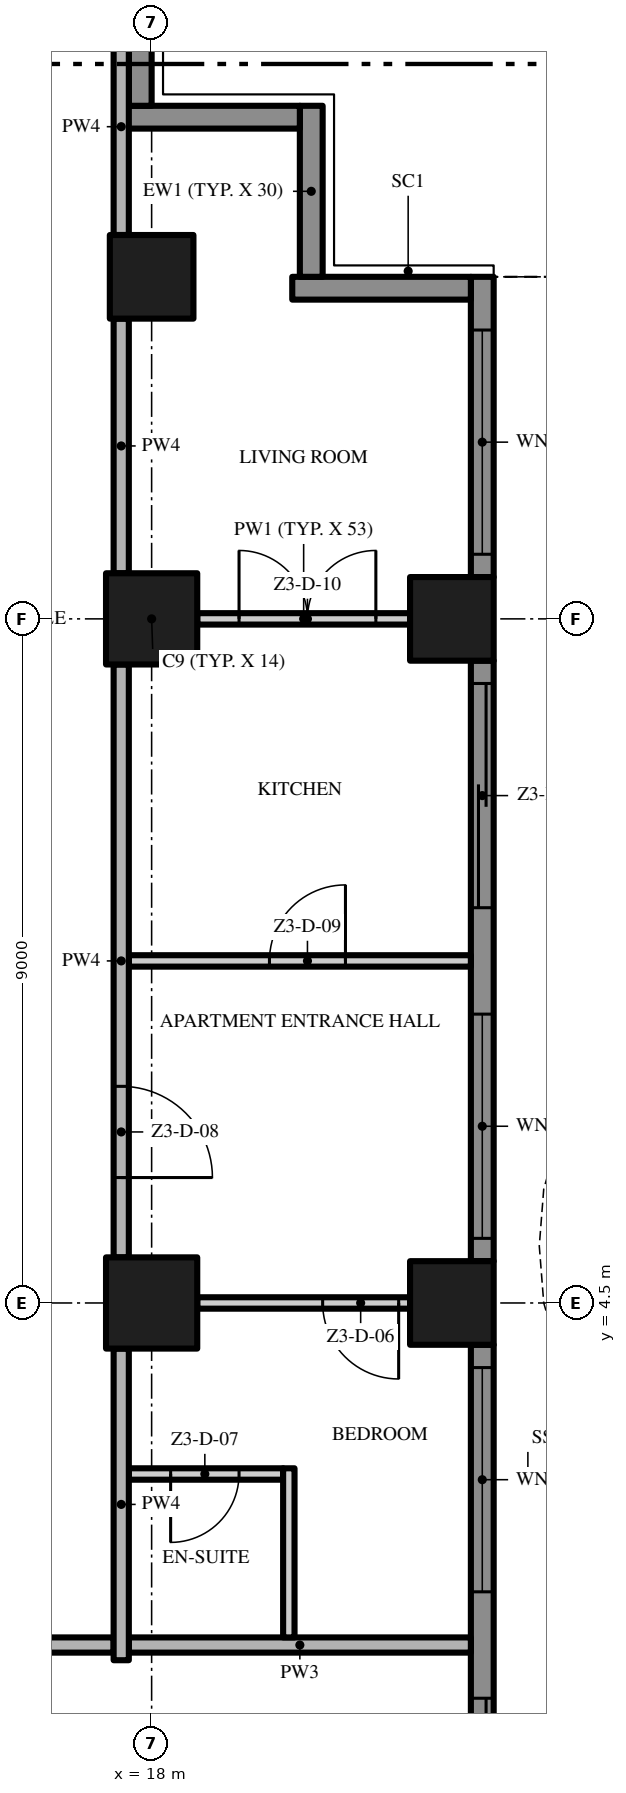
"""IFC4 building model, lengths in metres.
Left out: names, types, materials, properties, quantities, classifications, styles, units other than length and angle.
Written with IfcOpenShell. Run it as: python <this file> out.ifc"""

import sys

from ifc_helpers import new_model, si_unit, direction, frame, frame_2d, origin, origin_2d, place, context, subcontext, project, spatial, polyline, rectangle, outline, extrude, element, fill, save


model = new_model("IFC4")
c1 = context("Model", 3, precision=1e-05, world=origin(), true_north=direction((0.0, 1.0)))
c2 = subcontext(c1, "Body", "Model", "MODEL_VIEW")
j1 = project(units=[si_unit("LENGTHUNIT", "METRE"), si_unit("PLANEANGLEUNIT", "RADIAN")], contexts=[c1])
p1 = place(None, origin())
s1 = spatial("IfcSite", under=j1, at=p1, CompositionType="ELEMENT")
p2 = place(p1, origin())
s2 = spatial("IfcBuilding", under=s1, at=p2, CompositionType="ELEMENT")
p3 = place(p2, frame((0.0, 0.0, 159.2)))
s3 = spatial("IfcBuildingStorey", under=s2, at=p3, CompositionType="ELEMENT", Elevation=159.2)
for number, where, z_axis, x_axis in (
    (1, (18.0, 13.5, 0.0), (0.0, 0.0, 1.0), (1.0, 0.0, 0.0)),
    (2, (18.0, 4.5, 0.0), (0.0, 0.0, 1.0), (1.0, 0.0, 0.0)),
):
    element("IfcColumn", number, at=place(p3, frame(where, z_axis=z_axis, x_axis=x_axis)), inside=s3, PredefinedType="COLUMN", context=c2, shape_type="SweptSolid", body=[
        extrude(rectangle(XDim=1.2, YDim=1.2, at=origin_2d()), origin(), (0.0, 0.0, 1.0), 3.5),
    ])
for number, where, z_axis, x_axis in (
    (3, (21.95, 13.5, 0.0), (0.0, 0.0, 1.0), (1.0, 0.0, 0.0)),
    (4, (18.0, 18.0, 0.0), (0.0, 0.0, 1.0), (1.0, 0.0, 0.0)),
    (5, (21.95, 4.5, 0.0), (0.0, 0.0, 1.0), (1.0, 0.0, 0.0)),
):
    element("IfcColumn", number, at=place(p3, frame(where, z_axis=z_axis, x_axis=x_axis)), inside=s3, PredefinedType="COLUMN", context=c2, shape_type="SweptSolid", body=[
        extrude(rectangle(XDim=1.1, YDim=1.1, at=origin_2d()), origin(), (0.0, 0.0, 1.0), 3.5),
    ])
p4 = place(p3, frame((22.35, 3.95, 0.0), z_axis=(0.0, 0.0, 1.0), x_axis=(0.0, -1.0, 0.0)))
e6 = element("IfcWall", 6, at=p4, inside=s3, PredefinedType="SOLIDWALL", context=c2, shape_type="SweptSolid", body=[
    extrude(rectangle(XDim=7.9, YDim=0.3, at=frame_2d((3.95, 0.0))), origin(), (0.0, 0.0, 1.0), 3.5),
])
p5 = place(p4, frame((4.65, 0.0, 0.0)))
e7 = element("IfcOpeningElement", 7, at=p5, cuts=e6, PredefinedType="OPENING", context=c2, shape_type="SweptSolid", body=[
    extrude(rectangle(XDim=2.95, YDim=2.4, at=frame_2d((1.475, 1.2))), frame((0.0, 0.16, 0.0), z_axis=(0.0, -1.0, 0.0), x_axis=(1.0, 0.0, 0.0)), (0.0, 0.0, 1.0), 0.32),
])
p6 = place(p4, frame((0.3, 0.0, 0.45)))
e8 = element("IfcOpeningElement", 8, at=p6, cuts=e6, PredefinedType="OPENING", context=c2, shape_type="SweptSolid", body=[
    extrude(rectangle(XDim=2.95, YDim=2.65, at=frame_2d((1.475, 1.325))), frame((0.0, 0.16, 0.0), z_axis=(0.0, -1.0, 0.0), x_axis=(1.0, 0.0, 0.0)), (0.0, 0.0, 1.0), 0.32),
])
p7 = place(p3, frame((22.35, 12.95, 0.0), z_axis=(0.0, 0.0, 1.0), x_axis=(0.0, -1.0, 0.0)))
e9 = element("IfcWall", 9, at=p7, inside=s3, PredefinedType="SOLIDWALL", context=c2, shape_type="SweptSolid", body=[
    extrude(rectangle(XDim=7.9, YDim=0.3, at=frame_2d((3.95, 0.0))), origin(), (0.0, 0.0, 1.0), 3.5),
])
p8 = place(p7, frame((4.65, 0.0, 0.45)))
e10 = element("IfcOpeningElement", 10, at=p8, cuts=e9, PredefinedType="OPENING", context=c2, shape_type="SweptSolid", body=[
    extrude(rectangle(XDim=2.95, YDim=2.65, at=frame_2d((1.475, 1.325))), frame((0.0, 0.16, 0.0), z_axis=(0.0, -1.0, 0.0), x_axis=(1.0, 0.0, 0.0)), (0.0, 0.0, 1.0), 0.32),
])
p9 = place(p7, frame((0.3, 0.0, 0.0)))
e11 = element("IfcOpeningElement", 11, at=p9, cuts=e9, PredefinedType="OPENING", context=c2, shape_type="SweptSolid", body=[
    extrude(rectangle(XDim=2.95, YDim=2.4, at=frame_2d((1.475, 1.2))), frame((0.0, 0.16, 0.0), z_axis=(0.0, -1.0, 0.0), x_axis=(1.0, 0.0, 0.0)), (0.0, 0.0, 1.0), 0.32),
])
p10 = place(p3, frame((22.35, 18.0, 0.0), z_axis=(0.0, 0.0, 1.0), x_axis=(0.0, -1.0, 0.0)))
e12 = element("IfcWall", 12, at=p10, inside=s3, PredefinedType="SOLIDWALL", context=c2, shape_type="SweptSolid", body=[
    extrude(rectangle(XDim=3.95, YDim=0.3, at=frame_2d((1.975, 0.0))), origin(), (0.0, 0.0, 1.0), 3.5),
])
p11 = place(p10, frame((0.7, 0.0, 0.45)))
e13 = element("IfcOpeningElement", 13, at=p11, cuts=e12, PredefinedType="OPENING", context=c2, shape_type="SweptSolid", body=[
    extrude(rectangle(XDim=2.95, YDim=2.65, at=frame_2d((1.475, 1.325))), frame((0.0, 0.16, 0.0), z_axis=(0.0, -1.0, 0.0), x_axis=(1.0, 0.0, 0.0)), (0.0, 0.0, 1.0), 0.32),
])
p12 = place(p3, frame((19.85, 17.85, 0.0), z_axis=(0.0, 0.0, 1.0), x_axis=(1.0, 0.0, 0.0)))
e14 = element("IfcWall", 14, at=p12, inside=s3, PredefinedType="SOLIDWALL", context=c2, shape_type="SweptSolid", body=[
    extrude(rectangle(XDim=2.35, YDim=0.3, at=frame_2d((1.175, 0.0))), origin(), (0.0, 0.0, 1.0), 3.5),
])
p13 = place(p3, frame((20.1, 20.25, 0.0), z_axis=(0.0, 0.0, 1.0), x_axis=(0.0, -1.0, 0.0)))
e15 = element("IfcWall", 15, at=p13, inside=s3, PredefinedType="SOLIDWALL", context=c2, shape_type="SweptSolid", body=[
    extrude(rectangle(XDim=2.25, YDim=0.3, at=frame_2d((1.125, 0.0))), origin(), (0.0, 0.0, 1.0), 3.5),
])
p14 = place(p3, frame((17.6, 20.1, 0.0), z_axis=(0.0, 0.0, 1.0), x_axis=(1.0, 0.0, 0.0)))
e16 = element("IfcWall", 16, at=p14, inside=s3, PredefinedType="SOLIDWALL", context=c2, shape_type="SweptSolid", body=[
    extrude(rectangle(XDim=2.35, YDim=0.3, at=frame_2d((1.175, 0.0))), origin(), (0.0, 0.0, 1.0), 3.5),
])
p15 = place(p3, frame((17.85, 21.4, 0.0), z_axis=(0.0, 0.0, 1.0), x_axis=(0.0, -1.0, 0.0)))
e17 = element("IfcWall", 17, at=p15, inside=s3, PredefinedType="SOLIDWALL", context=c2, shape_type="SweptSolid", body=[
    extrude(rectangle(XDim=1.15, YDim=0.3, at=frame_2d((0.575, 0.0))), origin(), (0.0, 0.0, 1.0), 3.5),
])
p16 = place(p3, origin())
e18 = element("IfcWall", 18, at=p16, inside=s3, PredefinedType="USERDEFINED", context=c2, shape_type="SweptSolid", body=[
    extrude(outline(polyline([(24.3, -13.5), (23.595, -12.0), (23.159, -10.5), (23.1, -9.75), (23.159, -9.0), (23.595, -7.5), (24.3, -6.0), (25.005, -4.5), (25.441, -3.0), (25.5, -2.25), (25.441, -1.5), (25.005, 0.0), (24.3, 1.5), (23.595, 3.0), (23.159, 4.5), (23.1, 5.25), (23.159, 6.0), (23.595, 7.5), (24.3, 9.0), (25.005, 10.5), (25.441, 12.0), (25.5, 12.75), (25.441, 13.5), (25.005, 15.0), (24.3, 16.5), (23.595, 18.0), (23.368, 17.894), (24.074, 16.394), (24.771, 14.911), (25.194, 13.455), (25.249, 12.75), (25.194, 12.045), (24.771, 10.589), (24.074, 9.106), (23.36, 7.589), (22.911, 6.045), (22.849, 5.25), (22.911, 4.455), (23.36, 2.911), (24.074, 1.394), (24.771, -0.089), (25.194, -1.545), (25.249, -2.25), (25.194, -2.955), (24.771, -4.411), (24.074, -5.894), (23.36, -7.411), (22.911, -8.955), (22.849, -9.75), (22.911, -10.545), (23.36, -12.089), (24.074, -13.606), (24.3, -13.5)])), origin(), (0.0, 0.0, 1.0), 0.9),
])
p17 = place(p3, frame((17.5, 0.0, 0.0), z_axis=(0.0, 0.0, 1.0), x_axis=(-1.0, 0.0, 0.0)))
e19 = element("IfcWall", 19, at=p17, inside=s3, PredefinedType="PARTITIONING", context=c2, shape_type="SweptSolid", body=[
    extrude(rectangle(XDim=35.0, YDim=0.2, at=frame_2d((17.5, 0.0))), origin(), (0.0, 0.0, 1.0), 3.5),
])
p18 = place(p17, frame((23.5, 0.0, 0.0)))
e20 = element("IfcOpeningElement", 20, at=p18, cuts=e19, PredefinedType="OPENING", context=c2, shape_type="SweptSolid", body=[
    extrude(rectangle(XDim=1.5, YDim=2.4, at=frame_2d((0.75, 1.2))), frame((0.0, 0.11, 0.0), z_axis=(0.0, -1.0, 0.0), x_axis=(1.0, 0.0, 0.0)), (0.0, 0.0, 1.0), 0.22),
])
p19 = place(p17, frame((5.5, 0.0, 0.0)))
e21 = element("IfcOpeningElement", 21, at=p19, cuts=e19, PredefinedType="OPENING", context=c2, shape_type="SweptSolid", body=[
    extrude(rectangle(XDim=1.5, YDim=2.4, at=frame_2d((0.75, 1.2))), frame((0.0, 0.11, 0.0), z_axis=(0.0, -1.0, 0.0), x_axis=(1.0, 0.0, 0.0)), (0.0, 0.0, 1.0), 0.22),
])
p20 = place(p3, frame((17.7, 0.0, 0.0), z_axis=(0.0, 0.0, 1.0), x_axis=(1.0, 0.0, 0.0)))
e22 = element("IfcWall", 22, at=p20, inside=s3, PredefinedType="PARTITIONING", context=c2, shape_type="SweptSolid", body=[
    extrude(rectangle(XDim=4.5, YDim=0.2, at=frame_2d((2.25, 0.0))), origin(), (0.0, 0.0, 1.0), 3.5),
])
p21 = place(p3, frame((19.73, 2.25, 0.0), z_axis=(0.0, 0.0, 1.0), x_axis=(-1.0, 0.0, 0.0)))
e23 = element("IfcWall", 23, at=p21, inside=s3, PredefinedType="PARTITIONING", context=c2, shape_type="SweptSolid", body=[
    extrude(rectangle(XDim=2.03, YDim=0.15, at=frame_2d((1.015, 0.0))), origin(), (0.0, 0.0, 1.0), 3.5),
])
p22 = place(p21, frame((0.58, 0.0, 0.0)))
e24 = element("IfcOpeningElement", 24, at=p22, cuts=e23, PredefinedType="OPENING", context=c2, shape_type="SweptSolid", body=[
    extrude(rectangle(XDim=0.9, YDim=2.1, at=frame_2d((0.45, 1.05))), frame((0.0, 0.085, 0.0), z_axis=(0.0, -1.0, 0.0), x_axis=(1.0, 0.0, 0.0)), (0.0, 0.0, 1.0), 0.17),
])
p23 = place(p3, frame((21.4, 4.5, 0.0), z_axis=(0.0, 0.0, 1.0), x_axis=(-1.0, 0.0, 0.0)))
e25 = element("IfcWall", 25, at=p23, inside=s3, PredefinedType="PARTITIONING", context=c2, shape_type="SweptSolid", body=[
    extrude(rectangle(XDim=2.8, YDim=0.15, at=frame_2d((1.4, 0.0))), origin(), (0.0, 0.0, 1.0), 3.5),
])
p24 = place(p23, frame((0.15, 0.0, 0.0)))
e26 = element("IfcOpeningElement", 26, at=p24, cuts=e25, PredefinedType="OPENING", context=c2, shape_type="SweptSolid", body=[
    extrude(rectangle(XDim=1.0, YDim=2.4, at=frame_2d((0.5, 1.2))), frame((0.0, 0.085, 0.0), z_axis=(0.0, -1.0, 0.0), x_axis=(1.0, 0.0, 0.0)), (0.0, 0.0, 1.0), 0.17),
])
p25 = place(p3, frame((17.7, 9.0, 0.0), z_axis=(0.0, 0.0, 1.0), x_axis=(1.0, 0.0, 0.0)))
e27 = element("IfcWall", 27, at=p25, inside=s3, PredefinedType="PARTITIONING", context=c2, shape_type="SweptSolid", body=[
    extrude(rectangle(XDim=4.5, YDim=0.15, at=frame_2d((2.25, 0.0))), origin(), (0.0, 0.0, 1.0), 3.5),
])
p26 = place(p25, frame((1.85, 0.0, 0.0)))
e28 = element("IfcOpeningElement", 28, at=p26, cuts=e27, PredefinedType="OPENING", context=c2, shape_type="SweptSolid", body=[
    extrude(rectangle(XDim=1.0, YDim=2.4, at=frame_2d((0.5, 1.2))), frame((0.0, 0.085, 0.0), z_axis=(0.0, -1.0, 0.0), x_axis=(1.0, 0.0, 0.0)), (0.0, 0.0, 1.0), 0.17),
])
p27 = place(p3, frame((18.6, 13.5, 0.0), z_axis=(0.0, 0.0, 1.0), x_axis=(1.0, 0.0, 0.0)))
e29 = element("IfcWall", 29, at=p27, inside=s3, PredefinedType="PARTITIONING", context=c2, shape_type="SweptSolid", body=[
    extrude(rectangle(XDim=2.8, YDim=0.15, at=frame_2d((1.4, 0.0))), origin(), (0.0, 0.0, 1.0), 3.5),
])
p28 = place(p27, frame((0.55, 0.0, 0.0)))
e30 = element("IfcOpeningElement", 30, at=p28, cuts=e29, PredefinedType="OPENING", context=c2, shape_type="SweptSolid", body=[
    extrude(rectangle(XDim=1.8, YDim=2.4, at=frame_2d((0.9, 1.2))), frame((0.0, 0.085, 0.0), z_axis=(0.0, -1.0, 0.0), x_axis=(1.0, 0.0, 0.0)), (0.0, 0.0, 1.0), 0.17),
])
p29 = place(p3, frame((17.6, -0.2, 0.0), z_axis=(0.0, 0.0, 1.0), x_axis=(0.0, 1.0, 0.0)))
e31 = element("IfcWall", 31, at=p29, inside=s3, PredefinedType="PARTITIONING", context=c2, shape_type="SweptSolid", body=[
    extrude(rectangle(XDim=4.1, YDim=0.2, at=frame_2d((2.05, 0.0))), origin(), (0.0, 0.0, 1.0), 3.5),
])
p30 = place(p3, frame((17.6, 12.9, 0.0), z_axis=(0.0, 0.0, 1.0), x_axis=(0.0, -1.0, 0.0)))
e32 = element("IfcWall", 32, at=p30, inside=s3, PredefinedType="PARTITIONING", context=c2, shape_type="SweptSolid", body=[
    extrude(rectangle(XDim=7.8, YDim=0.2, at=frame_2d((3.9, 0.0))), origin(), (0.0, 0.0, 1.0), 3.5),
])
p31 = place(p30, frame((5.55, 0.0, 0.0)))
e33 = element("IfcOpeningElement", 33, at=p31, cuts=e32, PredefinedType="OPENING", context=c2, shape_type="SweptSolid", body=[
    extrude(rectangle(XDim=1.2, YDim=2.4, at=frame_2d((0.6, 1.2))), frame((0.0, 0.11, 0.0), z_axis=(0.0, -1.0, 0.0), x_axis=(1.0, 0.0, 0.0)), (0.0, 0.0, 1.0), 0.22),
])
p32 = place(p3, frame((17.6, 14.1, 0.0), z_axis=(0.0, 0.0, 1.0), x_axis=(0.0, 1.0, 0.0)))
e34 = element("IfcWall", 34, at=p32, inside=s3, PredefinedType="PARTITIONING", context=c2, shape_type="SweptSolid", body=[
    extrude(rectangle(XDim=3.35, YDim=0.2, at=frame_2d((1.675, 0.0))), origin(), (0.0, 0.0, 1.0), 3.5),
])
p33 = place(p3, frame((17.6, 18.55, 0.0), z_axis=(0.0, 0.0, 1.0), x_axis=(0.0, 1.0, 0.0)))
e35 = element("IfcWall", 35, at=p33, inside=s3, PredefinedType="PARTITIONING", context=c2, shape_type="SweptSolid", body=[
    extrude(rectangle(XDim=2.85, YDim=0.2, at=frame_2d((1.425, 0.0))), origin(), (0.0, 0.0, 1.0), 3.5),
])
p34 = place(p3, frame((19.805, 0.1, 0.0), z_axis=(0.0, 0.0, 1.0), x_axis=(0.0, 1.0, 0.0)))
e36 = element("IfcWall", 36, at=p34, inside=s3, PredefinedType="PARTITIONING", context=c2, shape_type="SweptSolid", body=[
    extrude(rectangle(XDim=2.225, YDim=0.15, at=frame_2d((1.113, 0.0))), origin(), (0.0, 0.0, 1.0), 3.5),
])
p35 = place(p5, origin())
e37 = element("IfcDoor", 37, at=p35, inside=s3, OperationType="SINGLE_SWING_LEFT", PredefinedType="DOOR", context=c2, shape_type="SweptSolid", body=[
    extrude(rectangle(XDim=2.95, YDim=2.4, at=frame_2d((1.475, 1.2))), frame((0.0, 0.025, 0.0), z_axis=(0.0, -1.0, 0.0), x_axis=(1.0, 0.0, 0.0)), (0.0, 0.0, 1.0), 0.05),
])
fill(e7, e37)
p36 = place(p6, origin())
e38 = element("IfcWindow", 38, at=p36, inside=s3, PartitioningType="SINGLE_PANEL", PredefinedType="WINDOW", context=c2, shape_type="SweptSolid", body=[
    extrude(rectangle(XDim=2.95, YDim=2.65, at=frame_2d((1.475, 1.325))), frame((0.0, 0.03, 0.0), z_axis=(0.0, -1.0, 0.0), x_axis=(1.0, 0.0, 0.0)), (0.0, 0.0, 1.0), 0.06),
])
fill(e8, e38)
p37 = place(p8, origin())
e39 = element("IfcWindow", 39, at=p37, inside=s3, PartitioningType="SINGLE_PANEL", PredefinedType="WINDOW", context=c2, shape_type="SweptSolid", body=[
    extrude(rectangle(XDim=2.95, YDim=2.65, at=frame_2d((1.475, 1.325))), frame((0.0, 0.03, 0.0), z_axis=(0.0, -1.0, 0.0), x_axis=(1.0, 0.0, 0.0)), (0.0, 0.0, 1.0), 0.06),
])
fill(e10, e39)
p38 = place(p9, origin())
e40 = element("IfcDoor", 40, at=p38, inside=s3, OperationType="SINGLE_SWING_LEFT", PredefinedType="DOOR", context=c2, shape_type="SweptSolid", body=[
    extrude(rectangle(XDim=2.95, YDim=2.4, at=frame_2d((1.475, 1.2))), frame((0.0, 0.025, 0.0), z_axis=(0.0, -1.0, 0.0), x_axis=(1.0, 0.0, 0.0)), (0.0, 0.0, 1.0), 0.05),
])
fill(e11, e40)
p39 = place(p11, origin())
e41 = element("IfcWindow", 41, at=p39, inside=s3, PartitioningType="SINGLE_PANEL", PredefinedType="WINDOW", context=c2, shape_type="SweptSolid", body=[
    extrude(rectangle(XDim=2.95, YDim=2.65, at=frame_2d((1.475, 1.325))), frame((0.0, 0.03, 0.0), z_axis=(0.0, -1.0, 0.0), x_axis=(1.0, 0.0, 0.0)), (0.0, 0.0, 1.0), 0.06),
])
fill(e13, e41)
p40 = place(p24, origin())
e42 = element("IfcDoor", 42, at=p40, inside=s3, OperationType="SINGLE_SWING_LEFT", PredefinedType="DOOR", context=c2, shape_type="SweptSolid", body=[
    extrude(rectangle(XDim=1.0, YDim=2.4, at=frame_2d((0.5, 1.2))), frame((0.0, 0.025, 0.0), z_axis=(0.0, -1.0, 0.0), x_axis=(1.0, 0.0, 0.0)), (0.0, 0.0, 1.0), 0.05),
])
fill(e26, e42)
p41 = place(p22, origin())
e43 = element("IfcDoor", 43, at=p41, inside=s3, OperationType="SINGLE_SWING_RIGHT", PredefinedType="DOOR", context=c2, shape_type="SweptSolid", body=[
    extrude(rectangle(XDim=0.9, YDim=2.1, at=frame_2d((0.45, 1.05))), frame((0.0, 0.025, 0.0), z_axis=(0.0, -1.0, 0.0), x_axis=(1.0, 0.0, 0.0)), (0.0, 0.0, 1.0), 0.05),
])
fill(e24, e43)
p42 = place(p31, origin())
e44 = element("IfcDoor", 44, at=p42, inside=s3, OperationType="SINGLE_SWING_RIGHT", PredefinedType="DOOR", context=c2, shape_type="SweptSolid", body=[
    extrude(rectangle(XDim=1.2, YDim=2.4, at=frame_2d((0.6, 1.2))), frame((0.0, 0.025, 0.0), z_axis=(0.0, -1.0, 0.0), x_axis=(1.0, 0.0, 0.0)), (0.0, 0.0, 1.0), 0.05),
])
fill(e33, e44)
p43 = place(p26, origin())
e45 = element("IfcDoor", 45, at=p43, inside=s3, OperationType="SINGLE_SWING_RIGHT", PredefinedType="DOOR", context=c2, shape_type="SweptSolid", body=[
    extrude(rectangle(XDim=1.0, YDim=2.4, at=frame_2d((0.5, 1.2))), frame((0.0, 0.025, 0.0), z_axis=(0.0, -1.0, 0.0), x_axis=(1.0, 0.0, 0.0)), (0.0, 0.0, 1.0), 0.05),
])
fill(e28, e45)
p44 = place(p28, origin())
e46 = element("IfcDoor", 46, at=p44, inside=s3, OperationType="DOUBLE_DOOR_SINGLE_SWING", PredefinedType="DOOR", context=c2, shape_type="SweptSolid", body=[
    extrude(rectangle(XDim=1.8, YDim=2.4, at=frame_2d((0.9, 1.2))), frame((0.0, 0.025, 0.0), z_axis=(0.0, -1.0, 0.0), x_axis=(1.0, 0.0, 0.0)), (0.0, 0.0, 1.0), 0.05),
])
fill(e30, e46)
save(model, sys.argv[1])
